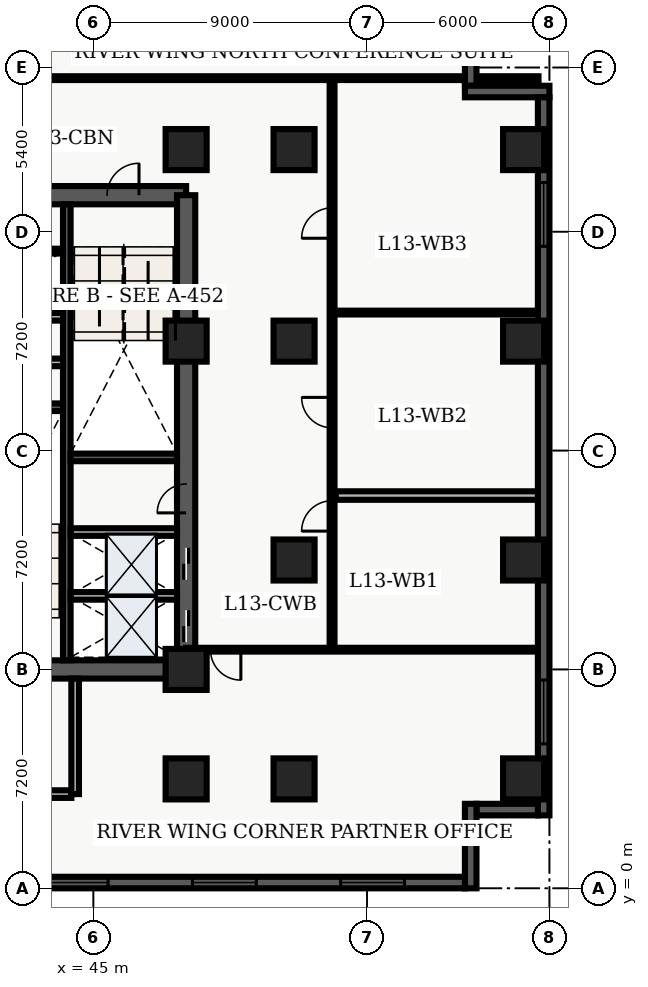
"""IFC4 building model, lengths in metres.
Left out: names, types, materials, properties, quantities, classifications, styles, units other than length and angle.
Written with IfcOpenShell. Run it as: python <this file> out.ifc"""

import sys

from ifc_helpers import new_model, entity, si_unit, converted_unit, direction, frame, origin_with_axes, origin_2d_with_axis, place, context, subcontext, project, spatial, polyline, rectangle, outline, extrude, element, fill, save


model = new_model("IFC4")
c1 = context("Model", 3, precision=1e-05, world=origin_with_axes(), true_north=direction((0.0, 1.0)))
c2 = subcontext(c1, "Body", "Model", "MODEL_VIEW")
j1 = project(units=[si_unit("LENGTHUNIT", "METRE"), converted_unit("PLANEANGLEUNIT", "DEGREE", entity("IfcPlaneAngleMeasure", 0.017), si_unit("PLANEANGLEUNIT", "RADIAN"), dimensions=[0, 0, 0, 0, 0, 0, 0])], contexts=[c1])
p1 = place(None, origin_with_axes())
s1 = spatial("IfcSite", under=j1, at=p1, CompositionType="ELEMENT")
p2 = place(p1, origin_with_axes())
s2 = spatial("IfcBuilding", under=s1, at=p2, CompositionType="ELEMENT")
p3 = place(p2, frame((0.0, 0.0, 56.1), z_axis=(0.0, 0.0, 1.0), x_axis=(1.0, 0.0, 0.0)))
s3 = spatial("IfcBuildingStorey", under=s2, at=p3, CompositionType="ELEMENT", Elevation=56.1)
p4 = place(p3, frame((40.2, 7.2, 0.0), z_axis=(0.0, 0.0, 1.0), x_axis=(1.0, 0.0, 0.0)))
e1 = element("IfcWall", 1, at=p4, inside=s3, PredefinedType="SHEAR", context=c2, shape_type="SweptSolid", body=[
    extrude(outline(polyline([(0.0, -0.3), (7.85, -0.3), (7.85, 0.3), (0.0, 0.3), (0.0, -0.3)])), origin_with_axes(), (0.0, 0.0, 1.0), 3.66),
])
p5 = place(p4, frame((2.175, 0.0, 0.0), z_axis=(0.0, 0.0, 1.0), x_axis=(1.0, 0.0, 0.0)))
e2 = element("IfcOpeningElement", 2, at=p5, cuts=e1, PredefinedType="OPENING", context=c2, shape_type="SweptSolid", body=[
    extrude(rectangle(XDim=1.05, YDim=0.62, at=origin_2d_with_axis()), origin_with_axes(), (0.0, 0.0, 1.0), 2.15),
])
p6 = place(p3, frame((40.2, 22.8, 0.0), z_axis=(0.0, 0.0, 1.0), x_axis=(1.0, 0.0, 0.0)))
e3 = element("IfcWall", 3, at=p6, inside=s3, PredefinedType="SHEAR", context=c2, shape_type="SweptSolid", body=[
    extrude(outline(polyline([(0.0, -0.3), (7.85, -0.3), (7.85, 0.3), (0.0, 0.3), (0.0, -0.3)])), origin_with_axes(), (0.0, 0.0, 1.0), 3.66),
])
p7 = place(p6, frame((5.775, 0.0, 0.0), z_axis=(0.0, 0.0, 1.0), x_axis=(1.0, 0.0, 0.0)))
e4 = element("IfcOpeningElement", 4, at=p7, cuts=e3, PredefinedType="OPENING", context=c2, shape_type="SweptSolid", body=[
    extrude(rectangle(XDim=1.05, YDim=0.62, at=origin_2d_with_axis()), origin_with_axes(), (0.0, 0.0, 1.0), 2.15),
])
p8 = place(p6, frame((2.15, 0.0, 0.0), z_axis=(0.0, 0.0, 1.0), x_axis=(1.0, 0.0, 0.0)))
e5 = element("IfcOpeningElement", 5, at=p8, cuts=e3, PredefinedType="OPENING", context=c2, shape_type="SweptSolid", body=[
    extrude(rectangle(XDim=0.9, YDim=0.62, at=origin_2d_with_axis()), origin_with_axes(), (0.0, 0.0, 1.0), 2.15),
])
p9 = place(p3, frame((48.05, 7.2, 0.0), z_axis=(0.0, 0.0, 1.0), x_axis=(0.0, 1.0, 0.0)))
e6 = element("IfcWall", 6, at=p9, inside=s3, PredefinedType="SHEAR", context=c2, shape_type="SweptSolid", body=[
    extrude(outline(polyline([(0.0, -0.3), (15.6, -0.3), (15.6, 0.3), (0.0, 0.3), (0.0, -0.3)])), origin_with_axes(), (0.0, 0.0, 1.0), 3.66),
])
p10 = place(p9, frame((1.425, 0.0, 0.0), z_axis=(0.0, 0.0, 1.0), x_axis=(1.0, 0.0, 0.0)))
e7 = element("IfcOpeningElement", 7, at=p10, cuts=e6, PredefinedType="OPENING", context=c2, shape_type="SweptSolid", body=[
    extrude(rectangle(XDim=1.05, YDim=0.62, at=origin_2d_with_axis()), origin_with_axes(), (0.0, 0.0, 1.0), 2.15),
])
p11 = place(p9, frame((3.475, 0.0, 0.0), z_axis=(0.0, 0.0, 1.0), x_axis=(1.0, 0.0, 0.0)))
e8 = element("IfcOpeningElement", 8, at=p11, cuts=e6, PredefinedType="OPENING", context=c2, shape_type="SweptSolid", body=[
    extrude(rectangle(XDim=1.05, YDim=0.62, at=origin_2d_with_axis()), origin_with_axes(), (0.0, 0.0, 1.0), 2.15),
])
p12 = place(p9, frame((5.625, 0.0, 0.0), z_axis=(0.0, 0.0, 1.0), x_axis=(1.0, 0.0, 0.0)))
e9 = element("IfcOpeningElement", 9, at=p12, cuts=e6, PredefinedType="OPENING", context=c2, shape_type="SweptSolid", body=[
    extrude(rectangle(XDim=0.95, YDim=0.62, at=origin_2d_with_axis()), origin_with_axes(), (0.0, 0.0, 1.0), 2.15),
])
p13 = place(p3, frame((44.125, 7.5, 0.0), z_axis=(0.0, 0.0, 1.0), x_axis=(0.0, 1.0, 0.0)))
e10 = element("IfcWall", 10, at=p13, inside=s3, PredefinedType="SHEAR", context=c2, shape_type="SweptSolid", body=[
    extrude(outline(polyline([(0.0, -0.125), (15.0, -0.125), (15.0, 0.125), (0.0, 0.125), (0.0, -0.125)])), origin_with_axes(), (0.0, 0.0, 1.0), 3.66),
])
for number, where, z_axis, x_axis in (
    (11, (40.5, 15.825, 0.0), (0.0, 0.0, 1.0), (1.0, 0.0, 0.0)),
    (12, (44.25, 14.175, 0.0), (0.0, 0.0, 1.0), (1.0, 0.0, 0.0)),
):
    element("IfcWall", number, at=place(p3, frame(where, z_axis=z_axis, x_axis=x_axis)), inside=s3, PredefinedType="SHEAR", context=c2, shape_type="SweptSolid", body=[
        extrude(outline(polyline([(0.0, -0.125), (3.5, -0.125), (3.5, 0.125), (0.0, 0.125), (0.0, -0.125)])), origin_with_axes(), (0.0, 0.0, 1.0), 3.66),
    ])
p14 = place(p3, frame((40.5, 17.3, 0.0), z_axis=(0.0, 0.0, 1.0), x_axis=(1.0, 0.0, 0.0)))
e13 = element("IfcWall", 13, at=p14, inside=s3, PredefinedType="SOLIDWALL", context=c2, shape_type="SweptSolid", body=[
    extrude(outline(polyline([(0.0, -0.125), (3.5, -0.125), (3.5, 0.125), (0.0, 0.125), (0.0, -0.125)])), origin_with_axes(), (0.0, 0.0, 1.0), 2.7),
])
p15 = place(p14, frame((2.4, 0.0, 0.0), z_axis=(0.0, 0.0, 1.0), x_axis=(1.0, 0.0, 0.0)))
e14 = element("IfcOpeningElement", 14, at=p15, cuts=e13, PredefinedType="OPENING", context=c2, shape_type="SweptSolid", body=[
    extrude(rectangle(XDim=0.9, YDim=0.27, at=origin_2d_with_axis()), origin_with_axes(), (0.0, 0.0, 1.0), 2.15),
])
p16 = place(p3, frame((40.5, 18.8, 0.0), z_axis=(0.0, 0.0, 1.0), x_axis=(1.0, 0.0, 0.0)))
e15 = element("IfcWall", 15, at=p16, inside=s3, PredefinedType="SOLIDWALL", context=c2, shape_type="SweptSolid", body=[
    extrude(outline(polyline([(0.0, -0.125), (3.5, -0.125), (3.5, 0.125), (0.0, 0.125), (0.0, -0.125)])), origin_with_axes(), (0.0, 0.0, 1.0), 2.7),
])
p17 = place(p3, frame((40.325, 3.1, 0.0), z_axis=(0.0, 0.0, 1.0), x_axis=(1.0, 0.0, 0.0)))
e16 = element("IfcWall", 16, at=p17, inside=s3, PredefinedType="SOLIDWALL", context=c2, shape_type="SweptSolid", body=[
    extrude(outline(polyline([(0.0, -0.125), (3.95, -0.125), (3.95, 0.125), (0.0, 0.125), (0.0, -0.125)])), origin_with_axes(), (0.0, 0.0, 1.0), 2.7),
])
p18 = place(p3, frame((44.4, 3.1, 0.0), z_axis=(0.0, 0.0, 1.0), x_axis=(0.0, 1.0, 0.0)))
e17 = element("IfcWall", 17, at=p18, inside=s3, PredefinedType="SOLIDWALL", context=c2, shape_type="SweptSolid", body=[
    extrude(outline(polyline([(0.0, -0.125), (3.8, -0.125), (3.8, 0.125), (0.0, 0.125), (0.0, -0.125)])), origin_with_axes(), (0.0, 0.0, 1.0), 2.7),
])
for number, where, z_axis, x_axis in (
    (18, (48.05, 3.6, 0.0), (0.0, 0.0, 1.0), (1.0, 0.0, 0.0)),
    (19, (48.05, 7.2, 0.0), (0.0, 0.0, 1.0), (1.0, 0.0, 0.0)),
    (20, (48.05, 18.0, 0.0), (0.0, 0.0, 1.0), (1.0, 0.0, 0.0)),
    (21, (48.05, 24.3, 0.0), (0.0, 0.0, 1.0), (1.0, 0.0, 0.0)),
    (22, (51.6, 3.6, 0.0), (0.0, 0.0, 1.0), (1.0, 0.0, 0.0)),
    (23, (51.6, 10.8, 0.0), (0.0, 0.0, 1.0), (1.0, 0.0, 0.0)),
    (24, (51.6, 18.0, 0.0), (0.0, 0.0, 1.0), (1.0, 0.0, 0.0)),
    (25, (51.6, 24.3, 0.0), (0.0, 0.0, 1.0), (1.0, 0.0, 0.0)),
    (26, (59.15, 3.6, 0.0), (0.0, 0.0, 1.0), (1.0, 0.0, 0.0)),
    (27, (59.15, 10.8, 0.0), (0.0, 0.0, 1.0), (1.0, 0.0, 0.0)),
    (28, (59.15, 18.0, 0.0), (0.0, 0.0, 1.0), (1.0, 0.0, 0.0)),
    (29, (59.15, 24.3, 0.0), (0.0, 0.0, 1.0), (1.0, 0.0, 0.0)),
):
    element("IfcColumn", number, at=place(p3, frame(where, z_axis=z_axis, x_axis=x_axis)), inside=s3, PredefinedType="COLUMN", context=c2, shape_type="SweptSolid", body=[
        extrude(rectangle(XDim=1.35, YDim=1.35, at=origin_2d_with_axis()), origin_with_axes(), (0.0, 0.0, 1.0), 3.9),
    ])
p19 = place(p3, frame((40.5, 20.96, 0.0), z_axis=(0.0, 0.0, 1.0), x_axis=(1.0, 0.0, 0.0)))
e30 = element("IfcWall", 30, at=p19, inside=s3, PredefinedType="PARTITIONING", context=c2, shape_type="SweptSolid", body=[
    extrude(outline(polyline([(0.0, -0.08), (3.5, -0.08), (3.5, 0.08), (0.0, 0.08), (0.0, -0.08)])), origin_with_axes(), (0.0, 0.0, 1.0), 2.7),
])
for number, where, z_axis, x_axis in (
    (31, (44.25, 9.62, 0.0), (0.0, 0.0, 1.0), (1.0, 0.0, 0.0)),
    (32, (44.25, 11.72, 0.0), (0.0, 0.0, 1.0), (1.0, 0.0, 0.0)),
):
    element("IfcWall", number, at=place(p3, frame(where, z_axis=z_axis, x_axis=x_axis)), inside=s3, PredefinedType="SOLIDWALL", context=c2, shape_type="SweptSolid", body=[
        extrude(outline(polyline([(0.0, -0.125), (3.5, -0.125), (3.5, 0.125), (0.0, 0.125), (0.0, -0.125)])), origin_with_axes(), (0.0, 0.0, 1.0), 2.7),
    ])
p20 = place(p3, frame((52.85, 7.85, 0.0), z_axis=(0.0, 0.0, 1.0), x_axis=(0.0, 1.0, 0.0)))
e33 = element("IfcWall", 33, at=p20, inside=s3, PredefinedType="PARTITIONING", context=c2, shape_type="SweptSolid", body=[
    extrude(outline(polyline([(0.0, -0.08), (18.8, -0.08), (18.8, 0.08), (0.0, 0.08), (0.0, -0.08)])), origin_with_axes(), (0.0, 0.0, 1.0), 2.7),
])
p21 = place(p20, frame((4.4, 0.0, 0.0), z_axis=(0.0, 0.0, 1.0), x_axis=(1.0, 0.0, 0.0)))
e34 = element("IfcOpeningElement", 34, at=p21, cuts=e33, PredefinedType="OPENING", context=c2, shape_type="SweptSolid", body=[
    extrude(rectangle(XDim=1.0, YDim=0.18, at=origin_2d_with_axis()), origin_with_axes(), (0.0, 0.0, 1.0), 2.15),
])
p22 = place(p20, frame((7.799, 0.0, 0.0), z_axis=(0.0, 0.0, 1.0), x_axis=(1.0, 0.0, 0.0)))
e35 = element("IfcOpeningElement", 35, at=p22, cuts=e33, PredefinedType="OPENING", context=c2, shape_type="SweptSolid", body=[
    extrude(rectangle(XDim=1.0, YDim=0.18, at=origin_2d_with_axis()), origin_with_axes(), (0.0, 0.0, 1.0), 2.15),
])
p23 = place(p20, frame((14.034, 0.0, 0.0), z_axis=(0.0, 0.0, 1.0), x_axis=(1.0, 0.0, 0.0)))
e36 = element("IfcOpeningElement", 36, at=p23, cuts=e33, PredefinedType="OPENING", context=c2, shape_type="SweptSolid", body=[
    extrude(rectangle(XDim=1.0, YDim=0.18, at=origin_2d_with_axis()), origin_with_axes(), (0.0, 0.0, 1.0), 2.15),
])
p24 = place(p3, frame((59.64, 7.85, 0.0), z_axis=(0.0, 0.0, 1.0), x_axis=(-1.0, 0.0, 0.0)))
e37 = element("IfcWall", 37, at=p24, inside=s3, PredefinedType="PARTITIONING", context=c2, shape_type="SweptSolid", body=[
    extrude(outline(polyline([(0.0, -0.062), (11.59, -0.062), (11.59, 0.062), (0.0, 0.062), (0.0, -0.062)])), origin_with_axes(), (0.0, 0.0, 1.0), 2.7),
])
p25 = place(p24, frame((10.29, 0.0, 0.0), z_axis=(0.0, 0.0, 1.0), x_axis=(1.0, 0.0, 0.0)))
e38 = element("IfcOpeningElement", 38, at=p25, cuts=e37, PredefinedType="OPENING", context=c2, shape_type="SweptSolid", body=[
    extrude(rectangle(XDim=1.0, YDim=0.145, at=origin_2d_with_axis()), origin_with_axes(), (0.0, 0.0, 1.0), 2.15),
])
p26 = place(p3, frame((38.76, 26.65, 0.0), z_axis=(0.0, 0.0, 1.0), x_axis=(1.0, 0.0, 0.0)))
e39 = element("IfcWall", 39, at=p26, inside=s3, PredefinedType="PARTITIONING", context=c2, shape_type="SweptSolid", body=[
    extrude(outline(polyline([(0.0, -0.062), (20.88, -0.062), (20.88, 0.062), (0.0, 0.062), (0.0, -0.062)])), origin_with_axes(), (0.0, 0.0, 1.0), 2.7),
])
p27 = place(p26, frame((4.24, 0.0, 0.0), z_axis=(0.0, 0.0, 1.0), x_axis=(1.0, 0.0, 0.0)))
e40 = element("IfcOpeningElement", 40, at=p27, cuts=e39, PredefinedType="OPENING", context=c2, shape_type="SweptSolid", body=[
    extrude(rectangle(XDim=1.0, YDim=0.145, at=origin_2d_with_axis()), origin_with_axes(), (0.0, 0.0, 1.0), 2.15),
])
p28 = place(p3, frame((52.97, 12.92, 0.0), z_axis=(0.0, 0.0, 1.0), x_axis=(1.0, 0.0, 0.0)))
e41 = element("IfcWall", 41, at=p28, inside=s3, PredefinedType="PARTITIONING", context=c2, shape_type="SweptSolid", body=[
    extrude(outline(polyline([(0.0, -0.14), (6.655, -0.14), (6.655, 0.14), (0.0, 0.14), (0.0, -0.14)])), origin_with_axes(), (0.0, 0.0, 1.0), 2.7),
])
p29 = place(p3, frame((52.97, 18.939, 0.0), z_axis=(0.0, 0.0, 1.0), x_axis=(1.0, 0.0, 0.0)))
e42 = element("IfcWall", 42, at=p29, inside=s3, PredefinedType="PARTITIONING", context=c2, shape_type="SweptSolid", body=[
    extrude(outline(polyline([(0.0, -0.062), (6.655, -0.062), (6.655, 0.062), (0.0, 0.062), (0.0, -0.062)])), origin_with_axes(), (0.0, 0.0, 1.0), 2.7),
])
p30 = place(p3, frame((57.41, 28.42, 0.0), z_axis=(0.0, 0.0, 1.0), x_axis=(0.0, -1.0, 0.0)))
e43 = element("IfcWall", 43, at=p30, inside=s3, PredefinedType="SOLIDWALL", context=c2, shape_type="SweptSolid", body=[
    extrude(outline(polyline([(0.0, -0.19), (2.02, -0.19), (2.02, 0.19), (0.0, 0.19), (0.0, -0.19)])), origin_with_axes(), (0.0, 0.0, 1.0), 3.66),
])
p31 = place(p3, frame((57.22, 26.21, 0.0), z_axis=(0.0, 0.0, 1.0), x_axis=(1.0, 0.0, 0.0)))
e44 = element("IfcWall", 44, at=p31, inside=s3, PredefinedType="SOLIDWALL", context=c2, shape_type="SweptSolid", body=[
    extrude(outline(polyline([(0.0, -0.19), (2.78, -0.19), (2.78, 0.19), (0.0, 0.19), (0.0, -0.19)])), origin_with_axes(), (0.0, 0.0, 1.0), 3.66),
])
p32 = place(p3, frame((59.81, 26.02, 0.0), z_axis=(0.0, 0.0, 1.0), x_axis=(0.0, -1.0, 0.0)))
e45 = element("IfcWall", 45, at=p32, inside=s3, PredefinedType="SOLIDWALL", context=c2, shape_type="SweptSolid", body=[
    extrude(outline(polyline([(0.0, -0.19), (23.62, -0.19), (23.62, 0.19), (0.0, 0.19), (0.0, -0.19)])), origin_with_axes(), (0.0, 0.0, 1.0), 3.66),
])
p33 = place(p32, frame((3.853, 0.0, 0.45), z_axis=(0.0, 0.0, 1.0), x_axis=(1.0, 0.0, 0.0)))
e46 = element("IfcOpeningElement", 46, at=p33, cuts=e45, PredefinedType="OPENING", context=c2, shape_type="SweptSolid", body=[
    extrude(rectangle(XDim=2.1, YDim=0.4, at=origin_2d_with_axis()), origin_with_axes(), (0.0, 0.0, 1.0), 2.2),
])
p34 = place(p32, frame((20.218, 0.0, 0.45), z_axis=(0.0, 0.0, 1.0), x_axis=(1.0, 0.0, 0.0)))
e47 = element("IfcOpeningElement", 47, at=p34, cuts=e45, PredefinedType="OPENING", context=c2, shape_type="SweptSolid", body=[
    extrude(rectangle(XDim=2.1, YDim=0.4, at=origin_2d_with_axis()), origin_with_axes(), (0.0, 0.0, 1.0), 2.2),
])
p35 = place(p3, frame((59.62, 2.59, 0.0), z_axis=(0.0, 0.0, 1.0), x_axis=(-1.0, 0.0, 0.0)))
e48 = element("IfcWall", 48, at=p35, inside=s3, PredefinedType="SOLIDWALL", context=c2, shape_type="SweptSolid", body=[
    extrude(outline(polyline([(0.0, -0.19), (2.02, -0.19), (2.02, 0.19), (0.0, 0.19), (0.0, -0.19)])), origin_with_axes(), (0.0, 0.0, 1.0), 3.66),
])
p36 = place(p3, frame((57.41, 2.78, 0.0), z_axis=(0.0, 0.0, 1.0), x_axis=(0.0, -1.0, 0.0)))
e49 = element("IfcWall", 49, at=p36, inside=s3, PredefinedType="SOLIDWALL", context=c2, shape_type="SweptSolid", body=[
    extrude(outline(polyline([(0.0, -0.19), (2.78, -0.19), (2.78, 0.19), (0.0, 0.19), (0.0, -0.19)])), origin_with_axes(), (0.0, 0.0, 1.0), 3.66),
])
p37 = place(p3, frame((57.22, 0.19, 0.0), z_axis=(0.0, 0.0, 1.0), x_axis=(-1.0, 0.0, 0.0)))
e50 = element("IfcWall", 50, at=p37, inside=s3, PredefinedType="SOLIDWALL", context=c2, shape_type="SweptSolid", body=[
    extrude(outline(polyline([(0.0, -0.19), (54.82, -0.19), (54.82, 0.19), (0.0, 0.19), (0.0, -0.19)])), origin_with_axes(), (0.0, 0.0, 1.0), 3.66),
])
p38 = place(p37, frame((3.037, 0.0, 0.45), z_axis=(0.0, 0.0, 1.0), x_axis=(1.0, 0.0, 0.0)))
e51 = element("IfcOpeningElement", 51, at=p38, cuts=e50, PredefinedType="OPENING", context=c2, shape_type="SweptSolid", body=[
    extrude(rectangle(XDim=2.1, YDim=0.4, at=origin_2d_with_axis()), origin_with_axes(), (0.0, 0.0, 1.0), 2.2),
])
p39 = place(p37, frame((7.912, 0.0, 0.45), z_axis=(0.0, 0.0, 1.0), x_axis=(1.0, 0.0, 0.0)))
e52 = element("IfcOpeningElement", 52, at=p39, cuts=e50, PredefinedType="OPENING", context=c2, shape_type="SweptSolid", body=[
    extrude(rectangle(XDim=2.1, YDim=0.4, at=origin_2d_with_axis()), origin_with_axes(), (0.0, 0.0, 1.0), 2.2),
])
p40 = place(p37, frame((12.786, 0.0, 0.45), z_axis=(0.0, 0.0, 1.0), x_axis=(1.0, 0.0, 0.0)))
e53 = element("IfcOpeningElement", 53, at=p40, cuts=e50, PredefinedType="OPENING", context=c2, shape_type="SweptSolid", body=[
    extrude(rectangle(XDim=2.1, YDim=0.4, at=origin_2d_with_axis()), origin_with_axes(), (0.0, 0.0, 1.0), 2.2),
])
p41 = place(p37, frame((17.661, 0.0, 0.45), z_axis=(0.0, 0.0, 1.0), x_axis=(1.0, 0.0, 0.0)))
e54 = element("IfcOpeningElement", 54, at=p41, cuts=e50, PredefinedType="OPENING", context=c2, shape_type="SweptSolid", body=[
    extrude(rectangle(XDim=2.1, YDim=0.4, at=origin_2d_with_axis()), origin_with_axes(), (0.0, 0.0, 1.0), 2.2),
])
p42 = place(p37, frame((22.535, 0.0, 0.45), z_axis=(0.0, 0.0, 1.0), x_axis=(1.0, 0.0, 0.0)))
e55 = element("IfcOpeningElement", 55, at=p42, cuts=e50, PredefinedType="OPENING", context=c2, shape_type="SweptSolid", body=[
    extrude(rectangle(XDim=2.1, YDim=0.4, at=origin_2d_with_axis()), origin_with_axes(), (0.0, 0.0, 1.0), 2.2),
])
p43 = place(p37, frame((37.159, 0.0, 0.45), z_axis=(0.0, 0.0, 1.0), x_axis=(1.0, 0.0, 0.0)))
e56 = element("IfcOpeningElement", 56, at=p43, cuts=e50, PredefinedType="OPENING", context=c2, shape_type="SweptSolid", body=[
    extrude(rectangle(XDim=2.1, YDim=0.4, at=origin_2d_with_axis()), origin_with_axes(), (0.0, 0.0, 1.0), 2.2),
])
p44 = place(p37, frame((42.034, 0.0, 0.45), z_axis=(0.0, 0.0, 1.0), x_axis=(1.0, 0.0, 0.0)))
e57 = element("IfcOpeningElement", 57, at=p44, cuts=e50, PredefinedType="OPENING", context=c2, shape_type="SweptSolid", body=[
    extrude(rectangle(XDim=2.1, YDim=0.4, at=origin_2d_with_axis()), origin_with_axes(), (0.0, 0.0, 1.0), 2.2),
])
p45 = place(p37, frame((51.783, 0.0, 0.45), z_axis=(0.0, 0.0, 1.0), x_axis=(1.0, 0.0, 0.0)))
e58 = element("IfcOpeningElement", 58, at=p45, cuts=e50, PredefinedType="OPENING", context=c2, shape_type="SweptSolid", body=[
    extrude(rectangle(XDim=2.1, YDim=0.4, at=origin_2d_with_axis()), origin_with_axes(), (0.0, 0.0, 1.0), 2.2),
])
p46 = place(p9, frame((1.425, 0.0, 0.0), z_axis=(0.0, 0.0, 1.0), x_axis=(1.0, 0.0, 0.0)))
e59 = element("IfcDoor", 59, at=p46, inside=s3, OperationType="SLIDING_TO_LEFT", PredefinedType="DOOR", context=c2, shape_type="SweptSolid", body=[
    extrude(rectangle(XDim=1.05, YDim=0.09, at=origin_2d_with_axis()), origin_with_axes(), (0.0, 0.0, 1.0), 2.15),
])
fill(e7, e59)
p47 = place(p9, frame((3.475, 0.0, 0.0), z_axis=(0.0, 0.0, 1.0), x_axis=(1.0, 0.0, 0.0)))
e60 = element("IfcDoor", 60, at=p47, inside=s3, OperationType="SLIDING_TO_RIGHT", PredefinedType="DOOR", context=c2, shape_type="SweptSolid", body=[
    extrude(rectangle(XDim=1.05, YDim=0.09, at=origin_2d_with_axis()), origin_with_axes(), (0.0, 0.0, 1.0), 2.15),
])
fill(e8, e60)
p48 = place(p6, frame((5.775, 0.0, 0.0), z_axis=(0.0, 0.0, 1.0), x_axis=(1.0, 0.0, 0.0)))
e61 = element("IfcDoor", 61, at=p48, inside=s3, OperationType="SINGLE_SWING_RIGHT", PredefinedType="DOOR", context=c2, shape_type="SweptSolid", body=[
    extrude(rectangle(XDim=1.05, YDim=0.09, at=origin_2d_with_axis()), origin_with_axes(), (0.0, 0.0, 1.0), 2.15),
])
fill(e4, e61)
p49 = place(p9, frame((5.625, 0.0, 0.0), z_axis=(0.0, 0.0, 1.0), x_axis=(1.0, 0.0, 0.0)))
e62 = element("IfcDoor", 62, at=p49, inside=s3, OperationType="SINGLE_SWING_LEFT", PredefinedType="DOOR", context=c2, shape_type="SweptSolid", body=[
    extrude(rectangle(XDim=0.95, YDim=0.09, at=origin_2d_with_axis()), origin_with_axes(), (0.0, 0.0, 1.0), 2.15),
])
fill(e9, e62)
p50 = place(p24, frame((10.29, 0.0, 0.0), z_axis=(0.0, 0.0, 1.0), x_axis=(1.0, 0.0, 0.0)))
e63 = element("IfcDoor", 63, at=p50, inside=s3, OperationType="SINGLE_SWING_LEFT", PredefinedType="DOOR", context=c2, shape_type="SweptSolid", body=[
    extrude(rectangle(XDim=1.0, YDim=0.075, at=origin_2d_with_axis()), origin_with_axes(), (0.0, 0.0, 1.0), 2.15),
])
fill(e38, e63)
p51 = place(p20, frame((4.4, 0.0, 0.0), z_axis=(0.0, 0.0, 1.0), x_axis=(1.0, 0.0, 0.0)))
e64 = element("IfcDoor", 64, at=p51, inside=s3, OperationType="SINGLE_SWING_LEFT", PredefinedType="DOOR", context=c2, shape_type="SweptSolid", body=[
    extrude(rectangle(XDim=1.0, YDim=0.09, at=origin_2d_with_axis()), origin_with_axes(), (0.0, 0.0, 1.0), 2.15),
])
fill(e34, e64)
p52 = place(p20, frame((7.799, 0.0, 0.0), z_axis=(0.0, 0.0, 1.0), x_axis=(1.0, 0.0, 0.0)))
e65 = element("IfcDoor", 65, at=p52, inside=s3, OperationType="SINGLE_SWING_RIGHT", PredefinedType="DOOR", context=c2, shape_type="SweptSolid", body=[
    extrude(rectangle(XDim=1.0, YDim=0.09, at=origin_2d_with_axis()), origin_with_axes(), (0.0, 0.0, 1.0), 2.15),
])
fill(e35, e65)
p53 = place(p20, frame((14.034, 0.0, 0.0), z_axis=(0.0, 0.0, 1.0), x_axis=(1.0, 0.0, 0.0)))
e66 = element("IfcDoor", 66, at=p53, inside=s3, OperationType="SINGLE_SWING_LEFT", PredefinedType="DOOR", context=c2, shape_type="SweptSolid", body=[
    extrude(rectangle(XDim=1.0, YDim=0.09, at=origin_2d_with_axis()), origin_with_axes(), (0.0, 0.0, 1.0), 2.15),
])
fill(e36, e66)
p54 = place(p32, frame((3.853, 0.0, 0.45), z_axis=(0.0, 0.0, 1.0), x_axis=(1.0, 0.0, 0.0)))
e67 = element("IfcWindow", 67, at=p54, inside=s3, PredefinedType="WINDOW", context=c2, shape_type="SweptSolid", body=[
    extrude(rectangle(XDim=2.1, YDim=0.09, at=origin_2d_with_axis()), origin_with_axes(), (0.0, 0.0, 1.0), 2.2),
])
fill(e46, e67)
p55 = place(p32, frame((20.218, 0.0, 0.45), z_axis=(0.0, 0.0, 1.0), x_axis=(1.0, 0.0, 0.0)))
e68 = element("IfcWindow", 68, at=p55, inside=s3, PredefinedType="WINDOW", context=c2, shape_type="SweptSolid", body=[
    extrude(rectangle(XDim=2.1, YDim=0.09, at=origin_2d_with_axis()), origin_with_axes(), (0.0, 0.0, 1.0), 2.2),
])
fill(e47, e68)
p56 = place(p37, frame((3.037, 0.0, 0.45), z_axis=(0.0, 0.0, 1.0), x_axis=(1.0, 0.0, 0.0)))
e69 = element("IfcWindow", 69, at=p56, inside=s3, PredefinedType="WINDOW", context=c2, shape_type="SweptSolid", body=[
    extrude(rectangle(XDim=2.1, YDim=0.09, at=origin_2d_with_axis()), origin_with_axes(), (0.0, 0.0, 1.0), 2.2),
])
fill(e51, e69)
p57 = place(p37, frame((7.912, 0.0, 0.45), z_axis=(0.0, 0.0, 1.0), x_axis=(1.0, 0.0, 0.0)))
e70 = element("IfcWindow", 70, at=p57, inside=s3, PredefinedType="WINDOW", context=c2, shape_type="SweptSolid", body=[
    extrude(rectangle(XDim=2.1, YDim=0.09, at=origin_2d_with_axis()), origin_with_axes(), (0.0, 0.0, 1.0), 2.2),
])
fill(e52, e70)
p58 = place(p37, frame((12.786, 0.0, 0.45), z_axis=(0.0, 0.0, 1.0), x_axis=(1.0, 0.0, 0.0)))
e71 = element("IfcWindow", 71, at=p58, inside=s3, PredefinedType="WINDOW", context=c2, shape_type="SweptSolid", body=[
    extrude(rectangle(XDim=2.1, YDim=0.09, at=origin_2d_with_axis()), origin_with_axes(), (0.0, 0.0, 1.0), 2.2),
])
fill(e53, e71)
save(model, sys.argv[1])
